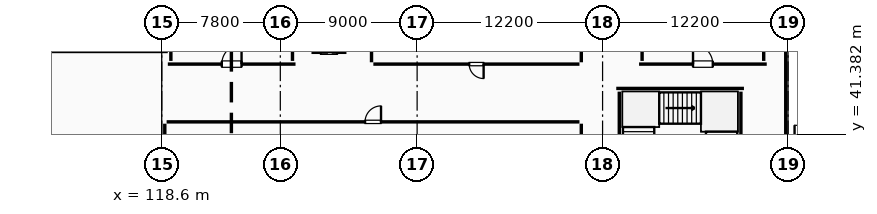
"""IFC4 building model, lengths in metres.
Left out: names, types, materials, properties, quantities, classifications, styles, units other than length and angle.
Written with IfcOpenShell. Run it as: python <this file> out.ifc"""

import sys

from ifc_helpers import new_model, si_unit, direction, frame, frame_2d, origin, origin_2d, place, context, subcontext, project, spatial, rectangle, i_section, extrude, element, fill, save


model = new_model("IFC4")
c1 = context("Model", 3, precision=1e-05, world=origin(), true_north=direction((0.0, 1.0)))
c2 = subcontext(c1, "Body", "Model", "MODEL_VIEW")
j1 = project(units=[si_unit("LENGTHUNIT", "METRE"), si_unit("PLANEANGLEUNIT", "RADIAN")], contexts=[c1])
p1 = place(None, origin())
s1 = spatial("IfcSite", under=j1, at=p1, CompositionType="ELEMENT")
p2 = place(p1, origin())
s2 = spatial("IfcBuilding", under=s1, at=p2, CompositionType="ELEMENT")
p3 = place(p2, origin())
s3 = spatial("IfcBuildingStorey", under=s2, at=p3, CompositionType="ELEMENT", Elevation=0.0)
for number, where, z_axis, x_axis in (
    (1, (151.22, 41.38, 0.0), (0.0, 0.0, 1.0), (1.0, 0.0, 0.0)),
    (2, (154.18, 41.38, 0.0), (0.0, 0.0, 1.0), (1.0, 0.0, 0.0)),
):
    element("IfcColumn", number, at=place(p3, frame(where, z_axis=z_axis, x_axis=x_axis)), inside=s3, PredefinedType="COLUMN", context=c2, shape_type="SweptSolid", body=[
        extrude(i_section(OverallWidth=0.25, OverallDepth=0.35, WebThickness=0.01, FlangeThickness=0.012, FilletRadius=0.012, at=origin_2d()), origin(), (0.0, 0.0, 1.0), 5.4),
    ])
p4 = place(p3, frame((112.6, 41.0, 0.0), z_axis=(0.0, 0.0, 1.0), x_axis=(1.0, 0.0, 0.0)))
e3 = element("IfcColumn", 3, at=p4, inside=s3, PredefinedType="COLUMN", context=c2, shape_type="SweptSolid", body=[
    extrude(rectangle(XDim=1.2, YDim=1.2, at=origin_2d()), origin(), (0.0, 0.0, 1.0), 5.4),
])
p5 = place(p3, frame((103.124, 46.83, 0.0), z_axis=(0.0, 0.0, 1.0), x_axis=(1.0, 0.0, 0.0)))
e4 = element("IfcWall", 4, at=p5, inside=s3, PredefinedType="STANDARD", context=c2, shape_type="SweptSolid", body=[
    extrude(rectangle(XDim=15.872, YDim=0.3, at=frame_2d((7.936, 0.0))), origin(), (0.0, 0.0, 1.0), 4.305),
])
p6 = place(p5, frame((7.126, 0.0, 0.95)))
e5 = element("IfcOpeningElement", 5, at=p6, cuts=e4, PredefinedType="OPENING", context=c2, shape_type="SweptSolid", body=[
    extrude(rectangle(XDim=1.1, YDim=1.5, at=frame_2d((0.55, 0.75))), frame((0.0, 0.16, 0.0), z_axis=(0.0, -1.0, 0.0), x_axis=(1.0, 0.0, 0.0)), (0.0, 0.0, 1.0), 0.32),
])
p7 = place(p3, frame((159.65, 49.792, 0.0), z_axis=(0.0, 0.0, 1.0), x_axis=(0.0, -1.0, 0.0)))
e6 = element("IfcWall", 6, at=p7, inside=s3, PredefinedType="ELEMENTEDWALL", context=c2, shape_type="SweptSolid", body=[
    extrude(rectangle(XDim=8.584, YDim=0.26, at=frame_2d((4.292, 0.0))), origin(), (0.0, 0.0, 1.0), 4.655),
])
p8 = place(p7, frame((0.22, 0.0, 0.0)))
e7 = element("IfcOpeningElement", 7, at=p8, cuts=e6, PredefinedType="OPENING", context=c2, shape_type="SweptSolid", body=[
    extrude(rectangle(XDim=1.8, YDim=2.25, at=frame_2d((0.9, 1.125))), frame((0.0, 0.14, 0.0), z_axis=(0.0, -1.0, 0.0), x_axis=(1.0, 0.0, 0.0)), (0.0, 0.0, 1.0), 0.28),
])
p9 = place(p3, frame((119.0, 46.0, 0.0), z_axis=(0.0, 0.0, 1.0), x_axis=(1.0, 0.0, 0.0)))
e8 = element("IfcWall", 8, at=p9, inside=s3, PredefinedType="SHEAR", context=c2, shape_type="SweptSolid", body=[
    extrude(rectangle(XDim=8.4, YDim=0.4, at=frame_2d((4.2, 0.0))), origin(), (0.0, 0.0, 1.0), 5.12),
])
p10 = place(p9, frame((3.55, 0.0, 0.0)))
e9 = element("IfcOpeningElement", 9, at=p10, cuts=e8, PredefinedType="OPENING", context=c2, shape_type="SweptSolid", body=[
    extrude(rectangle(XDim=1.3, YDim=2.15, at=frame_2d((0.65, 1.075))), frame((0.0, 0.21, 0.0), z_axis=(0.0, -1.0, 0.0), x_axis=(1.0, 0.0, 0.0)), (0.0, 0.0, 1.0), 0.42),
])
for number, where, z_axis, x_axis in (
    (10, (127.2, 46.21, 0.0), (0.0, 0.0, 1.0), (0.0, 1.0, 0.0)),
    (11, (119.2, 54.59, 0.0), (0.0, 0.0, 1.0), (0.0, -1.0, 0.0)),
):
    element("IfcWall", number, at=place(p3, frame(where, z_axis=z_axis, x_axis=x_axis)), inside=s3, PredefinedType="SHEAR", context=c2, shape_type="SweptSolid", body=[
        extrude(rectangle(XDim=8.38, YDim=0.4, at=frame_2d((4.19, 0.0))), origin(), (0.0, 0.0, 1.0), 5.12),
    ])
p11 = place(p3, frame((128.45, 46.775, 0.0), z_axis=(0.0, 0.0, 1.0), x_axis=(1.0, 0.0, 0.0)))
e12 = element("IfcWall", 12, at=p11, inside=s3, PredefinedType="STANDARD", context=c2, shape_type="SweptSolid", body=[
    extrude(rectangle(XDim=2.3, YDim=0.25, at=frame_2d((1.15, 0.0))), origin(), (0.0, 0.0, 1.0), 5.11),
])
p12 = place(p11, frame((0.6, 0.0, 0.0)))
e13 = element("IfcOpeningElement", 13, at=p12, cuts=e12, PredefinedType="OPENING", context=c2, shape_type="SweptSolid", body=[
    extrude(rectangle(XDim=1.1, YDim=2.15, at=frame_2d((0.55, 1.075))), frame((0.0, 0.135, 0.0), z_axis=(0.0, -1.0, 0.0), x_axis=(1.0, 0.0, 0.0)), (0.0, 0.0, 1.0), 0.27),
])
p13 = place(p3, frame((150.0, 46.0, 0.0), z_axis=(0.0, 0.0, 1.0), x_axis=(1.0, 0.0, 0.0)))
e14 = element("IfcWall", 14, at=p13, inside=s3, PredefinedType="SHEAR", context=c2, shape_type="SweptSolid", body=[
    extrude(rectangle(XDim=8.4, YDim=0.4, at=frame_2d((4.2, 0.0))), origin(), (0.0, 0.0, 1.0), 5.12),
])
p14 = place(p13, frame((3.55, 0.0, 0.0)))
e15 = element("IfcOpeningElement", 15, at=p14, cuts=e14, PredefinedType="OPENING", context=c2, shape_type="SweptSolid", body=[
    extrude(rectangle(XDim=1.3, YDim=2.15, at=frame_2d((0.65, 1.075))), frame((0.0, 0.21, 0.0), z_axis=(0.0, -1.0, 0.0), x_axis=(1.0, 0.0, 0.0)), (0.0, 0.0, 1.0), 0.42),
])
for number, where, z_axis, x_axis in (
    (16, (158.2, 46.21, 0.0), (0.0, 0.0, 1.0), (0.0, 1.0, 0.0)),
    (17, (150.2, 54.59, 0.0), (0.0, 0.0, 1.0), (0.0, -1.0, 0.0)),
):
    element("IfcWall", number, at=place(p3, frame(where, z_axis=z_axis, x_axis=x_axis)), inside=s3, PredefinedType="SHEAR", context=c2, shape_type="SweptSolid", body=[
        extrude(rectangle(XDim=8.38, YDim=0.4, at=frame_2d((4.19, 0.0))), origin(), (0.0, 0.0, 1.0), 5.12),
    ])
p15 = place(p3, frame((156.9, 44.4, 0.0), z_axis=(0.0, 0.0, 1.0), x_axis=(-1.0, 0.0, 0.0)))
e18 = element("IfcWall", 18, at=p15, inside=s3, PredefinedType="SHEAR", context=c2, shape_type="SweptSolid", body=[
    extrude(rectangle(XDim=8.4, YDim=0.4, at=frame_2d((4.2, 0.0))), origin(), (0.0, 0.0, 1.0), 5.12),
])
for number, where, z_axis, x_axis in (
    (19, (156.7, 35.81, 0.0), (0.0, 0.0, 1.0), (0.0, 1.0, 0.0)),
    (20, (148.7, 44.19, 0.0), (0.0, 0.0, 1.0), (0.0, -1.0, 0.0)),
):
    element("IfcWall", number, at=place(p3, frame(where, z_axis=z_axis, x_axis=x_axis)), inside=s3, PredefinedType="SHEAR", context=c2, shape_type="SweptSolid", body=[
        extrude(rectangle(XDim=8.38, YDim=0.4, at=frame_2d((4.19, 0.0))), origin(), (0.0, 0.0, 1.0), 5.12),
    ])
p16 = place(p3, frame((118.92, 42.2, 0.0), z_axis=(0.0, 0.0, 1.0), x_axis=(1.0, 0.0, 0.0)))
e21 = element("IfcWall", 21, at=p16, inside=s3, PredefinedType="PARTITIONING", context=c2, shape_type="SweptSolid", body=[
    extrude(rectangle(XDim=27.16, YDim=0.2, at=frame_2d((13.58, 0.0))), origin(), (0.0, 0.0, 1.0), 5.11),
])
p17 = place(p16, frame((13.055, 0.0, 0.0)))
e22 = element("IfcOpeningElement", 22, at=p17, cuts=e21, PredefinedType="OPENING", context=c2, shape_type="SweptSolid", body=[
    extrude(rectangle(XDim=1.05, YDim=2.15, at=frame_2d((0.525, 1.075))), frame((0.0, 0.11, 0.0), z_axis=(0.0, -1.0, 0.0), x_axis=(1.0, 0.0, 0.0)), (0.0, 0.0, 1.0), 0.22),
])
p18 = place(p3, frame((146.2, 42.08, 0.0), z_axis=(0.0, 0.0, 1.0), x_axis=(0.0, -1.0, 0.0)))
e23 = element("IfcWall", 23, at=p18, inside=s3, PredefinedType="PARTITIONING", context=c2, shape_type="SweptSolid", body=[
    extrude(rectangle(XDim=17.816, YDim=0.2, at=frame_2d((8.908, 0.0))), origin(), (0.0, 0.0, 1.0), 5.11),
])
p19 = place(p3, frame((118.8, 24.264, 0.0), z_axis=(0.0, 0.0, 1.0), x_axis=(0.0, 1.0, 0.0)))
e24 = element("IfcWall", 24, at=p19, inside=s3, PredefinedType="PARTITIONING", context=c2, shape_type="SweptSolid", body=[
    extrude(rectangle(XDim=17.816, YDim=0.2, at=frame_2d((8.908, 0.0))), origin(), (0.0, 0.0, 1.0), 4.3),
])
p20 = place(p3, frame((146.2, 55.736, 0.0), z_axis=(0.0, 0.0, 1.0), x_axis=(0.0, -1.0, 0.0)))
e25 = element("IfcWall", 25, at=p20, inside=s3, PredefinedType="PARTITIONING", context=c2, shape_type="SweptSolid", body=[
    extrude(rectangle(XDim=9.616, YDim=0.2, at=frame_2d((4.808, 0.0))), origin(), (0.0, 0.0, 1.0), 5.11),
])
p21 = place(p3, frame((146.08, 46.0, 0.0), z_axis=(0.0, 0.0, 1.0), x_axis=(-1.0, 0.0, 0.0)))
e26 = element("IfcWall", 26, at=p21, inside=s3, PredefinedType="PARTITIONING", context=c2, shape_type="SweptSolid", body=[
    extrude(rectangle(XDim=13.56, YDim=0.2, at=frame_2d((6.78, 0.0))), origin(), (0.0, 0.0, 1.0), 5.11),
])
p22 = place(p21, frame((6.305, 0.0, 0.0)))
e27 = element("IfcOpeningElement", 27, at=p22, cuts=e26, PredefinedType="OPENING", context=c2, shape_type="SweptSolid", body=[
    extrude(rectangle(XDim=0.95, YDim=2.15, at=frame_2d((0.475, 1.075))), frame((0.0, 0.11, 0.0), z_axis=(0.0, -1.0, 0.0), x_axis=(1.0, 0.0, 0.0)), (0.0, 0.0, 1.0), 0.22),
])
p23 = place(p3, frame((132.4, 46.12, 0.0), z_axis=(0.0, 0.0, 1.0), x_axis=(0.0, 1.0, 0.0)))
e28 = element("IfcWall", 28, at=p23, inside=s3, PredefinedType="PARTITIONING", context=c2, shape_type="SweptSolid", body=[
    extrude(rectangle(XDim=3.64, YDim=0.2, at=frame_2d((1.82, 0.0))), origin(), (0.0, 0.0, 1.0), 5.11),
])
p24 = place(p10, origin())
e29 = element("IfcDoor", 29, at=p24, inside=s3, OperationType="SINGLE_SWING_RIGHT", PredefinedType="DOOR", context=c2, shape_type="SweptSolid", body=[
    extrude(rectangle(XDim=1.3, YDim=2.15, at=frame_2d((0.65, 1.075))), frame((0.0, 0.025, 0.0), z_axis=(0.0, -1.0, 0.0), x_axis=(1.0, 0.0, 0.0)), (0.0, 0.0, 1.0), 0.05),
])
fill(e9, e29)
p25 = place(p12, origin())
e30 = element("IfcDoor", 30, at=p25, inside=s3, OperationType="DOUBLE_DOOR_SLIDING", PredefinedType="DOOR", context=c2, shape_type="SweptSolid", body=[
    extrude(rectangle(XDim=1.1, YDim=2.15, at=frame_2d((0.55, 1.075))), frame((0.0, 0.025, 0.0), z_axis=(0.0, -1.0, 0.0), x_axis=(1.0, 0.0, 0.0)), (0.0, 0.0, 1.0), 0.05),
])
fill(e13, e30)
p26 = place(p14, origin())
e31 = element("IfcDoor", 31, at=p26, inside=s3, OperationType="SINGLE_SWING_LEFT", PredefinedType="DOOR", context=c2, shape_type="SweptSolid", body=[
    extrude(rectangle(XDim=1.3, YDim=2.15, at=frame_2d((0.65, 1.075))), frame((0.0, 0.025, 0.0), z_axis=(0.0, -1.0, 0.0), x_axis=(1.0, 0.0, 0.0)), (0.0, 0.0, 1.0), 0.05),
])
fill(e15, e31)
p27 = place(p17, origin())
e32 = element("IfcDoor", 32, at=p27, inside=s3, OperationType="SINGLE_SWING_RIGHT", PredefinedType="DOOR", context=c2, shape_type="SweptSolid", body=[
    extrude(rectangle(XDim=1.05, YDim=2.15, at=frame_2d((0.525, 1.075))), frame((0.0, 0.025, 0.0), z_axis=(0.0, -1.0, 0.0), x_axis=(1.0, 0.0, 0.0)), (0.0, 0.0, 1.0), 0.05),
])
fill(e22, e32)
p28 = place(p22, origin())
e33 = element("IfcDoor", 33, at=p28, inside=s3, OperationType="SINGLE_SWING_LEFT", PredefinedType="DOOR", context=c2, shape_type="SweptSolid", body=[
    extrude(rectangle(XDim=0.95, YDim=2.15, at=frame_2d((0.475, 1.075))), frame((0.0, 0.025, 0.0), z_axis=(0.0, -1.0, 0.0), x_axis=(1.0, 0.0, 0.0)), (0.0, 0.0, 1.0), 0.05),
])
fill(e27, e33)
save(model, sys.argv[1])
